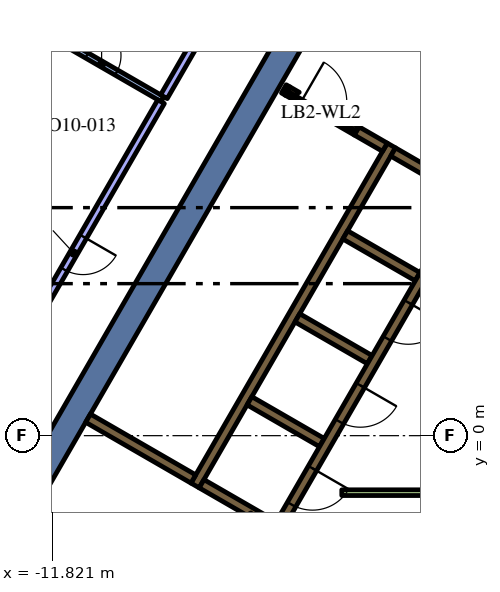
"""IFC4 building model, lengths in metres.
Left out: names, types, materials, properties, quantities, classifications, styles, units other than length and angle.
Written with IfcOpenShell. Run it as: python <this file> out.ifc"""

import sys

from ifc_helpers import new_model, si_unit, direction, frame, frame_2d, origin, place, context, subcontext, project, spatial, polyline, rectangle, outline, extrude, element, fill, save


model = new_model("IFC4")
c1 = context("Model", 3, precision=1e-05, world=origin(), true_north=direction((0.0, 1.0)))
c2 = subcontext(c1, "Body", "Model", "MODEL_VIEW")
j1 = project(units=[si_unit("LENGTHUNIT", "METRE"), si_unit("PLANEANGLEUNIT", "RADIAN")], contexts=[c1])
p1 = place(None, origin())
s1 = spatial("IfcSite", under=j1, at=p1, CompositionType="ELEMENT")
p2 = place(p1, origin())
s2 = spatial("IfcBuilding", under=s1, at=p2, CompositionType="ELEMENT")
p3 = place(p2, frame((0.0, 0.0, 252.0)))
s3 = spatial("IfcBuildingStorey", under=s2, at=p3, CompositionType="ELEMENT", Elevation=252.0)
p4 = place(p3, frame((-12.625, -1.867, 0.0), z_axis=(0.0, 0.0, 1.0), x_axis=(0.499996974394, 0.866027150612, 0.0)))
e1 = element("IfcWall", 1, at=p4, inside=s3, PredefinedType="SOLIDWALL", context=c2, shape_type="SweptSolid", body=[
    extrude(rectangle(XDim=15.858, YDim=0.7, at=frame_2d((7.929, 0.0))), origin(), (0.0, 0.0, 1.0), 4.2),
])
p5 = place(p3, frame((-8.06, -1.311, 0.0), z_axis=(0.0, 0.0, 1.0), x_axis=(0.50000273126, 0.866023826885, 0.0)))
e2 = element("IfcWall", 2, at=p5, inside=s3, PredefinedType="SOLIDWALL", context=c2, shape_type="SweptSolid", body=[
    extrude(rectangle(XDim=10.33, YDim=0.25, at=frame_2d((5.165, 0.0))), origin(), (0.0, 0.0, 1.0), 4.2),
])
p6 = place(p3, frame((-1.76, 6.836, 0.0), z_axis=(0.0, 0.0, 1.0), x_axis=(-0.865952863304, 0.500125622755, 0.0)))
e3 = element("IfcWall", 3, at=p6, inside=s3, PredefinedType="SOLIDWALL", context=c2, shape_type="SweptSolid", body=[
    extrude(rectangle(XDim=1.258, YDim=0.25, at=frame_2d((0.629, 0.0))), origin(), (0.0, 0.0, 1.0), 4.2),
])
for number, where, z_axis, x_axis in (
    (4, (-2.204, 4.182, 0.0), (0.0, 0.0, 1.0), (-0.866, 0.5, 0.0)),
    (5, (-5.369, 3.1, 0.0), (0.0, 0.0, 1.0), (0.866, -0.5, 0.0)),
    (6, (-4.724, -0.182, 0.0), (0.0, 0.0, 1.0), (-0.866, 0.5, 0.0)),
):
    element("IfcWall", number, at=place(p3, frame(where, z_axis=z_axis, x_axis=x_axis)), inside=s3, PredefinedType="SOLIDWALL", context=c2, shape_type="SweptSolid", body=[
        extrude(rectangle(XDim=2.2, YDim=0.25, at=frame_2d((1.1, 0.0))), origin(), (0.0, 0.0, 1.0), 4.2),
    ])
p7 = place(p3, origin())
e7 = element("IfcWall", 7, at=p7, inside=s3, PredefinedType="SOLIDWALL", context=c2, shape_type="SweptSolid", body=[
    extrude(outline(polyline([(-5.922, -2.257), (-5.922, -2.257), (-5.705, -2.382), (-5.83, -2.598), (-6.483, -2.221), (-6.591, -2.033), (-6.591, -2.033), (-6.7, -2.096), (-7.952, -1.373), (-7.827, -1.156), (-5.922, -2.257)])), origin(), (0.0, 0.0, 1.0), 4.2),
])
p8 = place(p3, frame((-8.106, -1.14, 0.0), z_axis=(0.0, 0.0, 1.0), x_axis=(-0.866008981251, 0.500028443584, 0.0)))
e8 = element("IfcWall", 8, at=p8, inside=s3, PredefinedType="SOLIDWALL", context=c2, shape_type="SweptSolid", body=[
    extrude(rectangle(XDim=3.2, YDim=0.25, at=frame_2d((1.6, 0.0))), origin(), (0.0, 0.0, 1.0), 4.2),
])
p9 = place(p3, frame((-5.725, 9.125, 0.0), z_axis=(0.0, 0.0, 1.0), x_axis=(0.866185586049, -0.49972245349, 0.0)))
e9 = element("IfcWall", 9, at=p9, inside=s3, PredefinedType="SOLIDWALL", context=c2, shape_type="SweptSolid", body=[
    extrude(rectangle(XDim=0.11, YDim=0.25, at=frame_2d((0.055, 0.0))), origin(), (0.0, 0.0, 1.0), 4.2),
])
p10 = place(p3, frame((-3.066, 7.59, 0.0), z_axis=(0.0, 0.0, 1.0), x_axis=(-0.866081358704, 0.49990307071, 0.0)))
e10 = element("IfcWall", 10, at=p10, inside=s3, PredefinedType="SOLIDWALL", context=c2, shape_type="SweptSolid", body=[
    extrude(rectangle(XDim=0.858, YDim=0.25, at=frame_2d((0.429, 0.0))), origin(), (0.0, 0.0, 1.0), 4.2),
])
e11 = element("IfcWall", 11, at=p7, inside=s3, PredefinedType="SOLIDWALL", context=c2, shape_type="SweptSolid", body=[
    extrude(outline(polyline([(-3.748, 8.128), (-3.813, 8.015), (-4.027, 8.139), (-4.017, 8.156), (-4.008, 8.173), (-4.0, 8.192), (-3.995, 8.21), (-3.991, 8.23), (-3.99, 8.25), (-3.99, 8.268), (-3.748, 8.128)])), origin(), (0.0, 0.0, 1.0), 4.2),
])
e12 = element("IfcWall", 12, at=p7, inside=s3, PredefinedType="SOLIDWALL", context=c2, shape_type="SweptSolid", body=[
    extrude(outline(polyline([(-5.689, 8.96), (-5.69, 8.961), (-5.565, 9.177), (-5.319, 9.035), (-5.335, 9.026), (-5.351, 9.015), (-5.366, 9.002), (-5.379, 8.988), (-5.392, 8.972), (-5.402, 8.956), (-5.412, 8.939), (-5.629, 9.064), (-5.629, 9.064), (-5.689, 8.96)])), origin(), (0.0, 0.0, 1.0), 4.2),
])
p11 = place(p3, frame((-4.2, -1.5, 0.0), z_axis=(0.0, 0.0, 1.0), x_axis=(1.0, 0.0, 0.0)))
e13 = element("IfcWall", 13, at=p11, inside=s3, PredefinedType="PARTITIONING", context=c2, shape_type="SweptSolid", body=[
    extrude(rectangle(XDim=9.359, YDim=0.15, at=frame_2d((4.68, 0.0))), origin(), (0.0, 0.0, 1.0), 3.4),
])
p12 = place(p3, frame((-0.898, 6.194, 0.0), z_axis=(0.0, 0.0, 1.0), x_axis=(-0.499996202215, -0.866027596426, 0.0)))
e14 = element("IfcWall", 14, at=p12, inside=s3, PredefinedType="SOLIDWALL", context=c2, shape_type="SweptSolid", body=[
    extrude(rectangle(XDim=9.83, YDim=0.25, at=frame_2d((4.915, 0.0))), origin(), (0.0, 0.0, 1.0), 4.2),
])
p13 = place(p12, frame((0.585, 0.0, 0.0)))
e15 = element("IfcOpeningElement", 15, at=p13, cuts=e14, PredefinedType="OPENING", context=c2, shape_type="SweptSolid", body=[
    extrude(rectangle(XDim=1.1, YDim=2.1, at=frame_2d((0.55, 1.05))), frame((0.0, 0.135, 0.0), z_axis=(0.0, -1.0, 0.0), x_axis=(1.0, 0.0, 0.0)), (0.0, 0.0, 1.0), 0.27),
])
p14 = place(p12, frame((3.105, 0.0, 0.0)))
e16 = element("IfcOpeningElement", 16, at=p14, cuts=e14, PredefinedType="OPENING", context=c2, shape_type="SweptSolid", body=[
    extrude(rectangle(XDim=1.1, YDim=2.1, at=frame_2d((0.55, 1.05))), frame((0.0, 0.135, 0.0), z_axis=(0.0, -1.0, 0.0), x_axis=(1.0, 0.0, 0.0)), (0.0, 0.0, 1.0), 0.27),
])
p15 = place(p12, frame((5.625, 0.0, 0.0)))
e17 = element("IfcOpeningElement", 17, at=p15, cuts=e14, PredefinedType="OPENING", context=c2, shape_type="SweptSolid", body=[
    extrude(rectangle(XDim=1.1, YDim=2.1, at=frame_2d((0.55, 1.05))), frame((0.0, 0.135, 0.0), z_axis=(0.0, -1.0, 0.0), x_axis=(1.0, 0.0, 0.0)), (0.0, 0.0, 1.0), 0.27),
])
p16 = place(p12, frame((8.145, 0.0, 0.0)))
e18 = element("IfcOpeningElement", 18, at=p16, cuts=e14, PredefinedType="OPENING", context=c2, shape_type="SweptSolid", body=[
    extrude(rectangle(XDim=1.1, YDim=2.1, at=frame_2d((0.55, 1.05))), frame((0.0, 0.135, 0.0), z_axis=(0.0, -1.0, 0.0), x_axis=(1.0, 0.0, 0.0)), (0.0, 0.0, 1.0), 0.27),
])
p17 = place(p3, frame((-5.659, 9.012, 0.0), z_axis=(0.0, 0.0, 1.0), x_axis=(0.866009402589, -0.500027713859, 0.0)))
e19 = element("IfcWall", 19, at=p17, inside=s3, PredefinedType="PARTITIONING", context=c2, shape_type="SweptSolid", body=[
    extrude(rectangle(XDim=2.1, YDim=0.12, at=frame_2d((1.05, 0.0))), origin(), (0.0, 0.0, 1.0), 3.4),
])
p18 = place(p17, frame((0.45, 0.0, 0.0)))
e20 = element("IfcOpeningElement", 20, at=p18, cuts=e19, PredefinedType="OPENING", context=c2, shape_type="SweptSolid", body=[
    extrude(rectangle(XDim=1.2, YDim=2.1, at=frame_2d((0.6, 1.05))), frame((0.0, 0.07, 0.0), z_axis=(0.0, -1.0, 0.0), x_axis=(1.0, 0.0, 0.0)), (0.0, 0.0, 1.0), 0.14),
])
p19 = place(p3, frame((-12.189, 10.742, 0.0), z_axis=(0.0, 0.0, 1.0), x_axis=(0.866023060049, -0.500004059447, 0.0)))
e21 = element("IfcWall", 21, at=p19, inside=s3, PredefinedType="PARTITIONING", context=c2, shape_type="SweptSolid", body=[
    extrude(rectangle(XDim=3.777, YDim=0.15, at=frame_2d((1.889, 0.0))), origin(), (0.0, 0.0, 1.0), 3.4),
])
p20 = place(p19, frame((1.477, 0.0, 0.0)))
e22 = element("IfcOpeningElement", 22, at=p20, cuts=e21, PredefinedType="OPENING", context=c2, shape_type="SweptSolid", body=[
    extrude(rectangle(XDim=0.9, YDim=2.1, at=frame_2d((0.45, 1.05))), frame((0.0, 0.085, 0.0), z_axis=(0.0, -1.0, 0.0), x_axis=(1.0, 0.0, 0.0)), (0.0, 0.0, 1.0), 0.17),
])
p21 = place(p3, frame((-7.522, 11.271, 0.0), z_axis=(0.0, 0.0, 1.0), x_axis=(-0.500005085581, -0.866022467603, 0.0)))
e23 = element("IfcWall", 23, at=p21, inside=s3, PredefinedType="PARTITIONING", context=c2, shape_type="SweptSolid", body=[
    extrude(rectangle(XDim=2.717, YDim=0.2, at=frame_2d((1.358, 0.0))), origin(), (0.0, 0.0, 1.0), 3.4),
])
p22 = place(p3, frame((-8.956, 8.789, 0.0), z_axis=(0.0, 0.0, 1.0), x_axis=(-0.500000119864, -0.866025334581, 0.0)))
e24 = element("IfcWall", 24, at=p22, inside=s3, PredefinedType="PARTITIONING", context=c2, shape_type="SweptSolid", body=[
    extrude(rectangle(XDim=9.133, YDim=0.2, at=frame_2d((4.567, 0.0))), origin(), (0.0, 0.0, 1.0), 3.4),
])
p23 = place(p22, frame((4.1, 0.0, 0.0)))
e25 = element("IfcOpeningElement", 25, at=p23, cuts=e24, PredefinedType="OPENING", context=c2, shape_type="SweptSolid", body=[
    extrude(rectangle(XDim=1.0, YDim=2.1, at=frame_2d((0.5, 1.05))), frame((0.0, 0.11, 0.0), z_axis=(0.0, -1.0, 0.0), x_axis=(1.0, 0.0, 0.0)), (0.0, 0.0, 1.0), 0.22),
])
p24 = place(p14, origin())
e26 = element("IfcDoor", 26, at=p24, inside=s3, OperationType="DOUBLE_DOOR_SLIDING", PredefinedType="DOOR", context=c2, shape_type="SweptSolid", body=[
    extrude(rectangle(XDim=1.1, YDim=2.1, at=frame_2d((0.55, 1.05))), frame((0.0, 0.025, 0.0), z_axis=(0.0, -1.0, 0.0), x_axis=(1.0, 0.0, 0.0)), (0.0, 0.0, 1.0), 0.05),
])
fill(e16, e26)
p25 = place(p15, origin())
e27 = element("IfcDoor", 27, at=p25, inside=s3, OperationType="DOUBLE_DOOR_SLIDING", PredefinedType="DOOR", context=c2, shape_type="SweptSolid", body=[
    extrude(rectangle(XDim=1.1, YDim=2.1, at=frame_2d((0.55, 1.05))), frame((0.0, 0.025, 0.0), z_axis=(0.0, -1.0, 0.0), x_axis=(1.0, 0.0, 0.0)), (0.0, 0.0, 1.0), 0.05),
])
fill(e17, e27)
p26 = place(p16, origin())
e28 = element("IfcDoor", 28, at=p26, inside=s3, OperationType="DOUBLE_DOOR_SLIDING", PredefinedType="DOOR", context=c2, shape_type="SweptSolid", body=[
    extrude(rectangle(XDim=1.1, YDim=2.1, at=frame_2d((0.55, 1.05))), frame((0.0, 0.025, 0.0), z_axis=(0.0, -1.0, 0.0), x_axis=(1.0, 0.0, 0.0)), (0.0, 0.0, 1.0), 0.05),
])
fill(e18, e28)
p27 = place(p18, origin())
e29 = element("IfcDoor", 29, at=p27, inside=s3, OperationType="SINGLE_SWING_LEFT", PredefinedType="DOOR", context=c2, shape_type="SweptSolid", body=[
    extrude(rectangle(XDim=1.2, YDim=2.1, at=frame_2d((0.6, 1.05))), frame((0.0, 0.025, 0.0), z_axis=(0.0, -1.0, 0.0), x_axis=(1.0, 0.0, 0.0)), (0.0, 0.0, 1.0), 0.05),
])
fill(e20, e29)
p28 = place(p20, origin())
e30 = element("IfcDoor", 30, at=p28, inside=s3, OperationType="SINGLE_SWING_RIGHT", PredefinedType="DOOR", context=c2, shape_type="SweptSolid", body=[
    extrude(rectangle(XDim=0.9, YDim=2.1, at=frame_2d((0.45, 1.05))), frame((0.0, 0.025, 0.0), z_axis=(0.0, -1.0, 0.0), x_axis=(1.0, 0.0, 0.0)), (0.0, 0.0, 1.0), 0.05),
])
fill(e22, e30)
p29 = place(p23, origin())
e31 = element("IfcDoor", 31, at=p29, inside=s3, OperationType="SINGLE_SWING_RIGHT", PredefinedType="DOOR", context=c2, shape_type="SweptSolid", body=[
    extrude(rectangle(XDim=1.0, YDim=2.1, at=frame_2d((0.5, 1.05))), frame((0.0, 0.025, 0.0), z_axis=(0.0, -1.0, 0.0), x_axis=(1.0, 0.0, 0.0)), (0.0, 0.0, 1.0), 0.05),
])
fill(e25, e31)
save(model, sys.argv[1])
